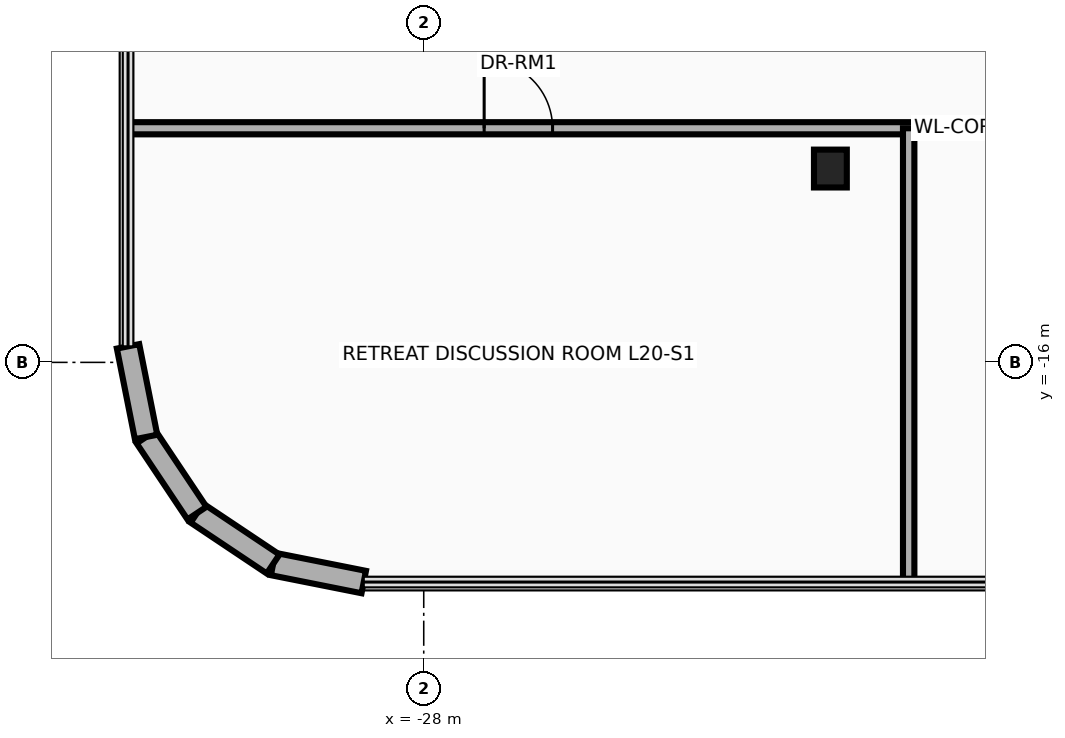
"""IFC4 building model, lengths in metres.
Left out: names, types, materials, properties, quantities, classifications, styles, units other than length and angle.
Written with IfcOpenShell. Run it as: python <this file> out.ifc"""

import sys

from ifc_helpers import new_model, si_unit, direction, frame, frame_2d, origin, origin_2d, place, context, subcontext, project, spatial, rectangle, i_section, extrude, source, transform, mapped, element, fill, save


model = new_model("IFC4")
c1 = context("Model", 3, precision=1e-05, world=origin(), true_north=direction((0.0, 1.0)))
c2 = subcontext(c1, "Body", "Model", "MODEL_VIEW")
j1 = project(units=[si_unit("LENGTHUNIT", "METRE"), si_unit("PLANEANGLEUNIT", "RADIAN")], contexts=[c1])
p1 = place(None, origin())
s1 = spatial("IfcSite", under=j1, at=p1, CompositionType="ELEMENT")
p2 = place(p1, origin())
s2 = spatial("IfcBuilding", under=s1, at=p2, CompositionType="ELEMENT")
p3 = place(p2, frame((0.0, 0.0, 81.5)))
s3 = spatial("IfcBuildingStorey", under=s2, at=p3, CompositionType="ELEMENT", Elevation=81.5)
m1 = source(origin(), c2, "Body", "SweptSolid", [
    extrude(i_section(OverallWidth=0.432, OverallDepth=0.498, WebThickness=0.056, FlangeThickness=0.089, at=origin_2d()), origin(), (0.0, 0.0, 1.0), 3.7),
])
p4 = place(p3, frame((-22.65, -13.45, 0.0), z_axis=(0.0, 0.0, 1.0), x_axis=(1.0, 0.0, 0.0)))
e1 = element("IfcColumn", 1, at=p4, inside=s3, PredefinedType="COLUMN", context=c2, shape_type="MappedRepresentation", body=[
    mapped(m1, transform((0.0, 0.0, 0.0), x_axis=(1.0, 0.0, 0.0), y_axis=(0.0, 1.0, 0.0), z_axis=(0.0, 0.0, 1.0), scale=1.0)),
])
p5 = place(p3, frame((-28.789, -18.89, 0.0), z_axis=(0.0, 0.0, 1.0), x_axis=(-0.980804027463, 0.194996050505, 0.0)))
e2 = element("IfcWall", 2, at=p5, inside=s3, PredefinedType="SOLIDWALL", context=c2, shape_type="SweptSolid", body=[
    extrude(rectangle(XDim=1.216, YDim=0.3, at=frame_2d((0.608, 0.0))), origin(), (0.0, 0.0, 1.0), 3.46),
])
for number, where, z_axis, x_axis in (
    (3, (-29.982, -18.653, 0.0), (0.0, 0.0, 1.0), (-0.831, 0.556, 0.0)),
    (4, (-30.983, -17.983, 0.0), (0.0, 0.0, 1.0), (-0.556, 0.831, 0.0)),
):
    element("IfcWall", number, at=place(p3, frame(where, z_axis=z_axis, x_axis=x_axis)), inside=s3, PredefinedType="SOLIDWALL", context=c2, shape_type="SweptSolid", body=[
        extrude(rectangle(XDim=1.205, YDim=0.3, at=frame_2d((0.603, 0.0))), origin(), (0.0, 0.0, 1.0), 3.46),
    ])
p6 = place(p3, frame((-31.653, -16.982, 0.0), z_axis=(0.0, 0.0, 1.0), x_axis=(-0.194996050505, 0.980804027463, 0.0)))
e5 = element("IfcWall", 5, at=p6, inside=s3, PredefinedType="SOLIDWALL", context=c2, shape_type="SweptSolid", body=[
    extrude(rectangle(XDim=1.216, YDim=0.3, at=frame_2d((0.608, 0.0))), origin(), (0.0, 0.0, 1.0), 3.46),
])
p7 = place(p3, frame((-31.89, -12.92, 0.0), z_axis=(0.0, 0.0, 1.0), x_axis=(1.0, 0.0, 0.0)))
e6 = element("IfcWall", 6, at=p7, inside=s3, PredefinedType="PARTITIONING", context=c2, shape_type="SweptSolid", body=[
    extrude(rectangle(XDim=22.28, YDim=0.16, at=frame_2d((11.14, 0.0))), origin(), (0.0, 0.0, 1.0), 2.834),
])
p8 = place(p7, frame((4.685, 0.0, 0.0)))
e7 = element("IfcOpeningElement", 7, at=p8, cuts=e6, PredefinedType="OPENING", context=c2, shape_type="SweptSolid", body=[
    extrude(rectangle(XDim=0.9, YDim=2.1, at=frame_2d((0.45, 1.05))), frame((0.0, 0.095, 0.0), z_axis=(0.0, -1.0, 0.0), x_axis=(1.0, 0.0, 0.0)), (0.0, 0.0, 1.0), 0.19),
])
p9 = place(p7, frame((15.825, 0.0, 0.0)))
e8 = element("IfcOpeningElement", 8, at=p9, cuts=e6, PredefinedType="OPENING", context=c2, shape_type="SweptSolid", body=[
    extrude(rectangle(XDim=0.9, YDim=2.1, at=frame_2d((0.45, 1.05))), frame((0.0, 0.095, 0.0), z_axis=(0.0, -1.0, 0.0), x_axis=(1.0, 0.0, 0.0)), (0.0, 0.0, 1.0), 0.19),
])
p10 = place(p3, frame((-21.62, -18.89, 0.0), z_axis=(0.0, 0.0, 1.0), x_axis=(0.0, 1.0, 0.0)))
e9 = element("IfcWall", 9, at=p10, inside=s3, PredefinedType="PARTITIONING", context=c2, shape_type="SweptSolid", body=[
    extrude(rectangle(XDim=5.97, YDim=0.15, at=frame_2d((2.985, 0.0))), origin(), (0.0, 0.0, 1.0), 2.896),
])
p11 = place(p8, origin())
e10 = element("IfcDoor", 10, at=p11, inside=s3, OperationType="SINGLE_SWING_RIGHT", PredefinedType="DOOR", context=c2, shape_type="SweptSolid", body=[
    extrude(rectangle(XDim=0.9, YDim=2.1, at=frame_2d((0.45, 1.05))), frame((0.0, 0.025, 0.0), z_axis=(0.0, -1.0, 0.0), x_axis=(1.0, 0.0, 0.0)), (0.0, 0.0, 1.0), 0.05),
])
fill(e7, e10)
save(model, sys.argv[1])
